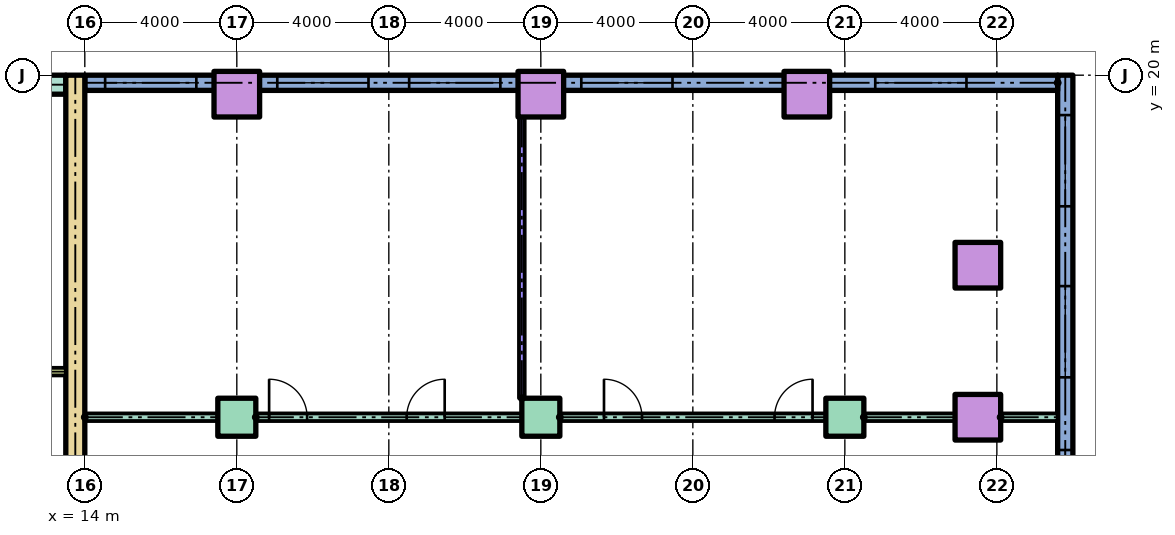
"""IFC4 building model, lengths in metres.
Left out: names, types, materials, properties, quantities, classifications, styles, units other than length and angle.
Written with IfcOpenShell. Run it as: python <this file> out.ifc"""

import sys

from ifc_helpers import new_model, si_unit, direction, frame, frame_2d, origin, origin_2d, place, context, subcontext, project, spatial, rectangle, hollow_rectangle, extrude, element, fill, save


model = new_model("IFC4")
c1 = context("Model", 3, precision=1e-05, world=origin(), true_north=direction((0.0, 1.0)))
c2 = subcontext(c1, "Body", "Model", "MODEL_VIEW")
j1 = project(units=[si_unit("LENGTHUNIT", "METRE"), si_unit("PLANEANGLEUNIT", "RADIAN")], contexts=[c1])
p1 = place(None, origin())
s1 = spatial("IfcSite", under=j1, at=p1, CompositionType="ELEMENT")
p2 = place(p1, origin())
s2 = spatial("IfcBuilding", under=s1, at=p2, CompositionType="ELEMENT")
p3 = place(p2, frame((0.0, 0.0, 10.0)))
s3 = spatial("IfcBuildingStorey", under=s2, at=p3, CompositionType="ELEMENT", Elevation=10.0)
for number, where in (
    (1, (18.0, 11.0, 0.0)),
    (2, (26.0, 11.0, 0.0)),
    (3, (34.0, 11.0, 0.0)),
):
    element("IfcColumn", number, at=place(p3, frame(where)), inside=s3, PredefinedType="COLUMN", context=c2, shape_type="SweptSolid", body=[
        extrude(rectangle(XDim=1.0, YDim=1.0, at=origin_2d()), origin(), (0.0, 0.0, 1.0), 4.0),
    ])
for number, where in (
    (4, (37.5, 11.0, 0.0)),
    (5, (37.5, 15.0, 0.0)),
    (6, (18.0, 19.5, 0.0)),
    (7, (26.0, 19.5, 0.0)),
    (8, (33.0, 19.5, 0.0)),
):
    element("IfcColumn", number, at=place(p3, frame(where)), inside=s3, PredefinedType="COLUMN", context=c2, shape_type="SweptSolid", body=[
        extrude(hollow_rectangle(XDim=1.2, YDim=1.2, WallThickness=0.06, at=origin_2d()), origin(), (0.0, 0.0, 1.0), 4.0),
    ])
p4 = place(p3, frame((39.8, -50.0, 0.0), z_axis=(0.0, 0.0, 1.0), x_axis=(0.0, 1.0, 0.0)))
e9 = element("IfcWall", 9, at=p4, inside=s3, PredefinedType="STANDARD", context=c2, shape_type="SweptSolid", body=[
    extrude(rectangle(XDim=70.0, YDim=0.4, at=frame_2d((35.0, 0.0))), origin(), (0.0, 0.0, 1.0), 3.7),
])
p5 = place(p4, frame((0.75, 0.0, 0.9)))
e10 = element("IfcOpeningElement", 10, at=p5, cuts=e9, PredefinedType="OPENING", context=c2, shape_type="SweptSolid", body=[
    extrude(rectangle(XDim=2.4, YDim=2.1, at=frame_2d((1.2, 1.05))), frame((0.0, 0.21, 0.0), z_axis=(0.0, -1.0, 0.0), x_axis=(1.0, 0.0, 0.0)), (0.0, 0.0, 1.0), 0.42),
])
p6 = place(p4, frame((17.633, 0.0, 0.9)))
e11 = element("IfcOpeningElement", 11, at=p6, cuts=e9, PredefinedType="OPENING", context=c2, shape_type="SweptSolid", body=[
    extrude(rectangle(XDim=2.4, YDim=2.1, at=frame_2d((1.2, 1.05))), frame((0.0, 0.21, 0.0), z_axis=(0.0, -1.0, 0.0), x_axis=(1.0, 0.0, 0.0)), (0.0, 0.0, 1.0), 0.42),
])
p7 = place(p4, frame((21.3, 0.0, 0.9)))
e12 = element("IfcOpeningElement", 12, at=p7, cuts=e9, PredefinedType="OPENING", context=c2, shape_type="SweptSolid", body=[
    extrude(rectangle(XDim=2.4, YDim=2.1, at=frame_2d((1.2, 1.05))), frame((0.0, 0.21, 0.0), z_axis=(0.0, -1.0, 0.0), x_axis=(1.0, 0.0, 0.0)), (0.0, 0.0, 1.0), 0.42),
])
p8 = place(p4, frame((24.967, 0.0, 0.9)))
e13 = element("IfcOpeningElement", 13, at=p8, cuts=e9, PredefinedType="OPENING", context=c2, shape_type="SweptSolid", body=[
    extrude(rectangle(XDim=2.4, YDim=2.1, at=frame_2d((1.2, 1.05))), frame((0.0, 0.21, 0.0), z_axis=(0.0, -1.0, 0.0), x_axis=(1.0, 0.0, 0.0)), (0.0, 0.0, 1.0), 0.42),
])
p9 = place(p4, frame((28.863, 0.0, 0.9)))
e14 = element("IfcOpeningElement", 14, at=p9, cuts=e9, PredefinedType="OPENING", context=c2, shape_type="SweptSolid", body=[
    extrude(rectangle(XDim=2.4, YDim=2.1, at=frame_2d((1.2, 1.05))), frame((0.0, 0.21, 0.0), z_axis=(0.0, -1.0, 0.0), x_axis=(1.0, 0.0, 0.0)), (0.0, 0.0, 1.0), 0.42),
])
p10 = place(p4, frame((32.988, 0.0, 0.9)))
e15 = element("IfcOpeningElement", 15, at=p10, cuts=e9, PredefinedType="OPENING", context=c2, shape_type="SweptSolid", body=[
    extrude(rectangle(XDim=2.4, YDim=2.1, at=frame_2d((1.2, 1.05))), frame((0.0, 0.21, 0.0), z_axis=(0.0, -1.0, 0.0), x_axis=(1.0, 0.0, 0.0)), (0.0, 0.0, 1.0), 0.42),
])
p11 = place(p4, frame((37.113, 0.0, 0.9)))
e16 = element("IfcOpeningElement", 16, at=p11, cuts=e9, PredefinedType="OPENING", context=c2, shape_type="SweptSolid", body=[
    extrude(rectangle(XDim=2.4, YDim=2.1, at=frame_2d((1.2, 1.05))), frame((0.0, 0.21, 0.0), z_axis=(0.0, -1.0, 0.0), x_axis=(1.0, 0.0, 0.0)), (0.0, 0.0, 1.0), 0.42),
])
p12 = place(p4, frame((41.238, 0.0, 0.9)))
e17 = element("IfcOpeningElement", 17, at=p12, cuts=e9, PredefinedType="OPENING", context=c2, shape_type="SweptSolid", body=[
    extrude(rectangle(XDim=2.4, YDim=2.1, at=frame_2d((1.2, 1.05))), frame((0.0, 0.21, 0.0), z_axis=(0.0, -1.0, 0.0), x_axis=(1.0, 0.0, 0.0)), (0.0, 0.0, 1.0), 0.42),
])
p13 = place(p4, frame((45.363, 0.0, 0.9)))
e18 = element("IfcOpeningElement", 18, at=p13, cuts=e9, PredefinedType="OPENING", context=c2, shape_type="SweptSolid", body=[
    extrude(rectangle(XDim=2.4, YDim=2.1, at=frame_2d((1.2, 1.05))), frame((0.0, 0.21, 0.0), z_axis=(0.0, -1.0, 0.0), x_axis=(1.0, 0.0, 0.0)), (0.0, 0.0, 1.0), 0.42),
])
p14 = place(p4, frame((49.488, 0.0, 0.9)))
e19 = element("IfcOpeningElement", 19, at=p14, cuts=e9, PredefinedType="OPENING", context=c2, shape_type="SweptSolid", body=[
    extrude(rectangle(XDim=2.4, YDim=2.1, at=frame_2d((1.2, 1.05))), frame((0.0, 0.21, 0.0), z_axis=(0.0, -1.0, 0.0), x_axis=(1.0, 0.0, 0.0)), (0.0, 0.0, 1.0), 0.42),
])
p15 = place(p4, frame((53.613, 0.0, 0.9)))
e20 = element("IfcOpeningElement", 20, at=p15, cuts=e9, PredefinedType="OPENING", context=c2, shape_type="SweptSolid", body=[
    extrude(rectangle(XDim=2.4, YDim=2.1, at=frame_2d((1.2, 1.05))), frame((0.0, 0.21, 0.0), z_axis=(0.0, -1.0, 0.0), x_axis=(1.0, 0.0, 0.0)), (0.0, 0.0, 1.0), 0.42),
])
p16 = place(p4, frame((57.738, 0.0, 0.9)))
e21 = element("IfcOpeningElement", 21, at=p16, cuts=e9, PredefinedType="OPENING", context=c2, shape_type="SweptSolid", body=[
    extrude(rectangle(XDim=2.4, YDim=2.1, at=frame_2d((1.2, 1.05))), frame((0.0, 0.21, 0.0), z_axis=(0.0, -1.0, 0.0), x_axis=(1.0, 0.0, 0.0)), (0.0, 0.0, 1.0), 0.42),
])
p17 = place(p4, frame((62.05, 0.0, 0.9)))
e22 = element("IfcOpeningElement", 22, at=p17, cuts=e9, PredefinedType="OPENING", context=c2, shape_type="SweptSolid", body=[
    extrude(rectangle(XDim=2.4, YDim=2.1, at=frame_2d((1.2, 1.05))), frame((0.0, 0.21, 0.0), z_axis=(0.0, -1.0, 0.0), x_axis=(1.0, 0.0, 0.0)), (0.0, 0.0, 1.0), 0.42),
])
p18 = place(p4, frame((66.55, 0.0, 0.9)))
e23 = element("IfcOpeningElement", 23, at=p18, cuts=e9, PredefinedType="OPENING", context=c2, shape_type="SweptSolid", body=[
    extrude(rectangle(XDim=2.4, YDim=2.1, at=frame_2d((1.2, 1.05))), frame((0.0, 0.21, 0.0), z_axis=(0.0, -1.0, 0.0), x_axis=(1.0, 0.0, 0.0)), (0.0, 0.0, 1.0), 0.42),
])
p19 = place(p3, frame((39.6, 19.8, 0.0), z_axis=(0.0, 0.0, 1.0), x_axis=(-1.0, 0.0, 0.0)))
e24 = element("IfcWall", 24, at=p19, inside=s3, PredefinedType="STANDARD", context=c2, shape_type="SweptSolid", body=[
    extrude(rectangle(XDim=25.6, YDim=0.4, at=frame_2d((12.8, 0.0))), origin(), (0.0, 0.0, 1.0), 3.7),
])
p20 = place(p19, frame((2.4, 0.0, 0.9)))
e25 = element("IfcOpeningElement", 25, at=p20, cuts=e24, PredefinedType="OPENING", context=c2, shape_type="SweptSolid", body=[
    extrude(rectangle(XDim=2.4, YDim=2.1, at=frame_2d((1.2, 1.05))), frame((0.0, 0.21, 0.0), z_axis=(0.0, -1.0, 0.0), x_axis=(1.0, 0.0, 0.0)), (0.0, 0.0, 1.0), 0.42),
])
p21 = place(p19, frame((10.135, 0.0, 0.9)))
e26 = element("IfcOpeningElement", 26, at=p21, cuts=e24, PredefinedType="OPENING", context=c2, shape_type="SweptSolid", body=[
    extrude(rectangle(XDim=2.4, YDim=2.1, at=frame_2d((1.2, 1.05))), frame((0.0, 0.21, 0.0), z_axis=(0.0, -1.0, 0.0), x_axis=(1.0, 0.0, 0.0)), (0.0, 0.0, 1.0), 0.42),
])
p22 = place(p19, frame((14.665, 0.0, 0.9)))
e27 = element("IfcOpeningElement", 27, at=p22, cuts=e24, PredefinedType="OPENING", context=c2, shape_type="SweptSolid", body=[
    extrude(rectangle(XDim=2.4, YDim=2.1, at=frame_2d((1.2, 1.05))), frame((0.0, 0.21, 0.0), z_axis=(0.0, -1.0, 0.0), x_axis=(1.0, 0.0, 0.0)), (0.0, 0.0, 1.0), 0.42),
])
p23 = place(p19, frame((18.135, 0.0, 0.9)))
e28 = element("IfcOpeningElement", 28, at=p23, cuts=e24, PredefinedType="OPENING", context=c2, shape_type="SweptSolid", body=[
    extrude(rectangle(XDim=2.4, YDim=2.1, at=frame_2d((1.2, 1.05))), frame((0.0, 0.21, 0.0), z_axis=(0.0, -1.0, 0.0), x_axis=(1.0, 0.0, 0.0)), (0.0, 0.0, 1.0), 0.42),
])
p24 = place(p19, frame((22.665, 0.0, 0.9)))
e29 = element("IfcOpeningElement", 29, at=p24, cuts=e24, PredefinedType="OPENING", context=c2, shape_type="SweptSolid", body=[
    extrude(rectangle(XDim=2.4, YDim=2.1, at=frame_2d((1.2, 1.05))), frame((0.0, 0.21, 0.0), z_axis=(0.0, -1.0, 0.0), x_axis=(1.0, 0.0, 0.0)), (0.0, 0.0, 1.0), 0.42),
])
p25 = place(p3, frame((13.75, 3.0, 0.0), z_axis=(0.0, 0.0, 1.0), x_axis=(0.0, 1.0, 0.0)))
e30 = element("IfcWall", 30, at=p25, inside=s3, PredefinedType="SHEAR", context=c2, shape_type="SweptSolid", body=[
    extrude(rectangle(XDim=17.0, YDim=0.5, at=frame_2d((8.5, 0.0))), origin(), (0.0, 0.0, 1.0), 3.7),
])
p26 = place(p3, frame((-13.5, 19.75, 0.0)))
e31 = element("IfcWall", 31, at=p26, inside=s3, PredefinedType="SHEAR", context=c2, shape_type="SweptSolid", body=[
    extrude(rectangle(XDim=27.0, YDim=0.5, at=frame_2d((13.5, 0.0))), origin(), (0.0, 0.0, 1.0), 3.7),
])
p27 = place(p3, frame((9.6, 12.2, 0.0)))
e32 = element("IfcWall", 32, at=p27, inside=s3, PredefinedType="PARTITIONING", context=c2, shape_type="SweptSolid", body=[
    extrude(rectangle(XDim=3.9, YDim=0.2, at=frame_2d((1.95, 0.0))), origin(), (0.0, 0.0, 1.0), 3.7),
])
p28 = place(p3, frame((14.0, 11.0, 0.0)))
e33 = element("IfcWall", 33, at=p28, inside=s3, PredefinedType="PARTITIONING", context=c2, shape_type="SweptSolid", body=[
    extrude(rectangle(XDim=3.5, YDim=0.2, at=frame_2d((1.75, 0.0))), origin(), (0.0, 0.0, 1.0), 3.7),
])
p29 = place(p3, frame((18.5, 11.0, 0.0)))
e34 = element("IfcWall", 34, at=p29, inside=s3, PredefinedType="PARTITIONING", context=c2, shape_type="SweptSolid", body=[
    extrude(rectangle(XDim=7.0, YDim=0.2, at=frame_2d((3.5, 0.0))), origin(), (0.0, 0.0, 1.0), 3.7),
])
p30 = place(p29, frame((0.35, 0.0, 0.0)))
e35 = element("IfcOpeningElement", 35, at=p30, cuts=e34, PredefinedType="OPENING", context=c2, shape_type="SweptSolid", body=[
    extrude(rectangle(XDim=1.0, YDim=2.1, at=frame_2d((0.5, 1.05))), frame((0.0, 0.11, 0.0), z_axis=(0.0, -1.0, 0.0), x_axis=(1.0, 0.0, 0.0)), (0.0, 0.0, 1.0), 0.22),
])
p31 = place(p29, frame((3.97, 0.0, 0.0)))
e36 = element("IfcOpeningElement", 36, at=p31, cuts=e34, PredefinedType="OPENING", context=c2, shape_type="SweptSolid", body=[
    extrude(rectangle(XDim=1.0, YDim=2.1, at=frame_2d((0.5, 1.05))), frame((0.0, 0.11, 0.0), z_axis=(0.0, -1.0, 0.0), x_axis=(1.0, 0.0, 0.0)), (0.0, 0.0, 1.0), 0.22),
])
p32 = place(p3, frame((26.5, 11.0, 0.0)))
e37 = element("IfcWall", 37, at=p32, inside=s3, PredefinedType="PARTITIONING", context=c2, shape_type="SweptSolid", body=[
    extrude(rectangle(XDim=7.0, YDim=0.2, at=frame_2d((3.5, 0.0))), origin(), (0.0, 0.0, 1.0), 3.7),
])
p33 = place(p32, frame((1.162, 0.0, 0.0)))
e38 = element("IfcOpeningElement", 38, at=p33, cuts=e37, PredefinedType="OPENING", context=c2, shape_type="SweptSolid", body=[
    extrude(rectangle(XDim=1.0, YDim=2.1, at=frame_2d((0.5, 1.05))), frame((0.0, 0.11, 0.0), z_axis=(0.0, -1.0, 0.0), x_axis=(1.0, 0.0, 0.0)), (0.0, 0.0, 1.0), 0.22),
])
p34 = place(p32, frame((5.65, 0.0, 0.0)))
e39 = element("IfcOpeningElement", 39, at=p34, cuts=e37, PredefinedType="OPENING", context=c2, shape_type="SweptSolid", body=[
    extrude(rectangle(XDim=1.0, YDim=2.1, at=frame_2d((0.5, 1.05))), frame((0.0, 0.11, 0.0), z_axis=(0.0, -1.0, 0.0), x_axis=(1.0, 0.0, 0.0)), (0.0, 0.0, 1.0), 0.22),
])
p35 = place(p3, frame((34.5, 11.0, 0.0)))
e40 = element("IfcWall", 40, at=p35, inside=s3, PredefinedType="PARTITIONING", context=c2, shape_type="SweptSolid", body=[
    extrude(rectangle(XDim=2.4, YDim=0.2, at=frame_2d((1.2, 0.0))), origin(), (0.0, 0.0, 1.0), 3.7),
])
p36 = place(p3, frame((38.1, 11.0, 0.0)))
e41 = element("IfcWall", 41, at=p36, inside=s3, PredefinedType="PARTITIONING", context=c2, shape_type="SweptSolid", body=[
    extrude(rectangle(XDim=1.5, YDim=0.2, at=frame_2d((0.75, 0.0))), origin(), (0.0, 0.0, 1.0), 3.7),
])
p37 = place(p3, frame((25.5, 11.5, 0.0), z_axis=(0.0, 0.0, 1.0), x_axis=(0.0, 1.0, 0.0)))
e42 = element("IfcWall", 42, at=p37, inside=s3, PredefinedType="PARTITIONING", context=c2, shape_type="SweptSolid", body=[
    extrude(rectangle(XDim=7.4, YDim=0.15, at=frame_2d((3.7, 0.0))), origin(), (0.0, 0.0, 1.0), 3.7),
])
p38 = place(p16, origin())
e43 = element("IfcWindow", 43, at=p38, inside=s3, PartitioningType="SINGLE_PANEL", PredefinedType="WINDOW", context=c2, shape_type="SweptSolid", body=[
    extrude(rectangle(XDim=2.4, YDim=2.1, at=frame_2d((1.2, 1.05))), frame((0.0, 0.03, 0.0), z_axis=(0.0, -1.0, 0.0), x_axis=(1.0, 0.0, 0.0)), (0.0, 0.0, 1.0), 0.06),
])
fill(e21, e43)
p39 = place(p17, origin())
e44 = element("IfcWindow", 44, at=p39, inside=s3, PartitioningType="SINGLE_PANEL", PredefinedType="WINDOW", context=c2, shape_type="SweptSolid", body=[
    extrude(rectangle(XDim=2.4, YDim=2.1, at=frame_2d((1.2, 1.05))), frame((0.0, 0.03, 0.0), z_axis=(0.0, -1.0, 0.0), x_axis=(1.0, 0.0, 0.0)), (0.0, 0.0, 1.0), 0.06),
])
fill(e22, e44)
p40 = place(p18, origin())
e45 = element("IfcWindow", 45, at=p40, inside=s3, PartitioningType="SINGLE_PANEL", PredefinedType="WINDOW", context=c2, shape_type="SweptSolid", body=[
    extrude(rectangle(XDim=2.4, YDim=2.1, at=frame_2d((1.2, 1.05))), frame((0.0, 0.03, 0.0), z_axis=(0.0, -1.0, 0.0), x_axis=(1.0, 0.0, 0.0)), (0.0, 0.0, 1.0), 0.06),
])
fill(e23, e45)
p41 = place(p20, origin())
e46 = element("IfcWindow", 46, at=p41, inside=s3, PartitioningType="SINGLE_PANEL", PredefinedType="WINDOW", context=c2, shape_type="SweptSolid", body=[
    extrude(rectangle(XDim=2.4, YDim=2.1, at=frame_2d((1.2, 1.05))), frame((0.0, 0.03, 0.0), z_axis=(0.0, -1.0, 0.0), x_axis=(1.0, 0.0, 0.0)), (0.0, 0.0, 1.0), 0.06),
])
fill(e25, e46)
p42 = place(p21, origin())
e47 = element("IfcWindow", 47, at=p42, inside=s3, PartitioningType="SINGLE_PANEL", PredefinedType="WINDOW", context=c2, shape_type="SweptSolid", body=[
    extrude(rectangle(XDim=2.4, YDim=2.1, at=frame_2d((1.2, 1.05))), frame((0.0, 0.03, 0.0), z_axis=(0.0, -1.0, 0.0), x_axis=(1.0, 0.0, 0.0)), (0.0, 0.0, 1.0), 0.06),
])
fill(e26, e47)
p43 = place(p22, origin())
e48 = element("IfcWindow", 48, at=p43, inside=s3, PartitioningType="SINGLE_PANEL", PredefinedType="WINDOW", context=c2, shape_type="SweptSolid", body=[
    extrude(rectangle(XDim=2.4, YDim=2.1, at=frame_2d((1.2, 1.05))), frame((0.0, 0.03, 0.0), z_axis=(0.0, -1.0, 0.0), x_axis=(1.0, 0.0, 0.0)), (0.0, 0.0, 1.0), 0.06),
])
fill(e27, e48)
p44 = place(p23, origin())
e49 = element("IfcWindow", 49, at=p44, inside=s3, PartitioningType="SINGLE_PANEL", PredefinedType="WINDOW", context=c2, shape_type="SweptSolid", body=[
    extrude(rectangle(XDim=2.4, YDim=2.1, at=frame_2d((1.2, 1.05))), frame((0.0, 0.03, 0.0), z_axis=(0.0, -1.0, 0.0), x_axis=(1.0, 0.0, 0.0)), (0.0, 0.0, 1.0), 0.06),
])
fill(e28, e49)
p45 = place(p24, origin())
e50 = element("IfcWindow", 50, at=p45, inside=s3, PartitioningType="SINGLE_PANEL", PredefinedType="WINDOW", context=c2, shape_type="SweptSolid", body=[
    extrude(rectangle(XDim=2.4, YDim=2.1, at=frame_2d((1.2, 1.05))), frame((0.0, 0.03, 0.0), z_axis=(0.0, -1.0, 0.0), x_axis=(1.0, 0.0, 0.0)), (0.0, 0.0, 1.0), 0.06),
])
fill(e29, e50)
p46 = place(p30, origin())
e51 = element("IfcDoor", 51, at=p46, inside=s3, OperationType="SINGLE_SWING_LEFT", PredefinedType="DOOR", context=c2, shape_type="SweptSolid", body=[
    extrude(rectangle(XDim=1.0, YDim=2.1, at=frame_2d((0.5, 1.05))), frame((0.0, 0.025, 0.0), z_axis=(0.0, -1.0, 0.0), x_axis=(1.0, 0.0, 0.0)), (0.0, 0.0, 1.0), 0.05),
])
fill(e35, e51)
p47 = place(p31, origin())
e52 = element("IfcDoor", 52, at=p47, inside=s3, OperationType="SINGLE_SWING_RIGHT", PredefinedType="DOOR", context=c2, shape_type="SweptSolid", body=[
    extrude(rectangle(XDim=1.0, YDim=2.1, at=frame_2d((0.5, 1.05))), frame((0.0, 0.025, 0.0), z_axis=(0.0, -1.0, 0.0), x_axis=(1.0, 0.0, 0.0)), (0.0, 0.0, 1.0), 0.05),
])
fill(e36, e52)
p48 = place(p33, origin())
e53 = element("IfcDoor", 53, at=p48, inside=s3, OperationType="SINGLE_SWING_LEFT", PredefinedType="DOOR", context=c2, shape_type="SweptSolid", body=[
    extrude(rectangle(XDim=1.0, YDim=2.1, at=frame_2d((0.5, 1.05))), frame((0.0, 0.025, 0.0), z_axis=(0.0, -1.0, 0.0), x_axis=(1.0, 0.0, 0.0)), (0.0, 0.0, 1.0), 0.05),
])
fill(e38, e53)
p49 = place(p34, origin())
e54 = element("IfcDoor", 54, at=p49, inside=s3, OperationType="SINGLE_SWING_RIGHT", PredefinedType="DOOR", context=c2, shape_type="SweptSolid", body=[
    extrude(rectangle(XDim=1.0, YDim=2.1, at=frame_2d((0.5, 1.05))), frame((0.0, 0.025, 0.0), z_axis=(0.0, -1.0, 0.0), x_axis=(1.0, 0.0, 0.0)), (0.0, 0.0, 1.0), 0.05),
])
fill(e39, e54)
save(model, sys.argv[1])
